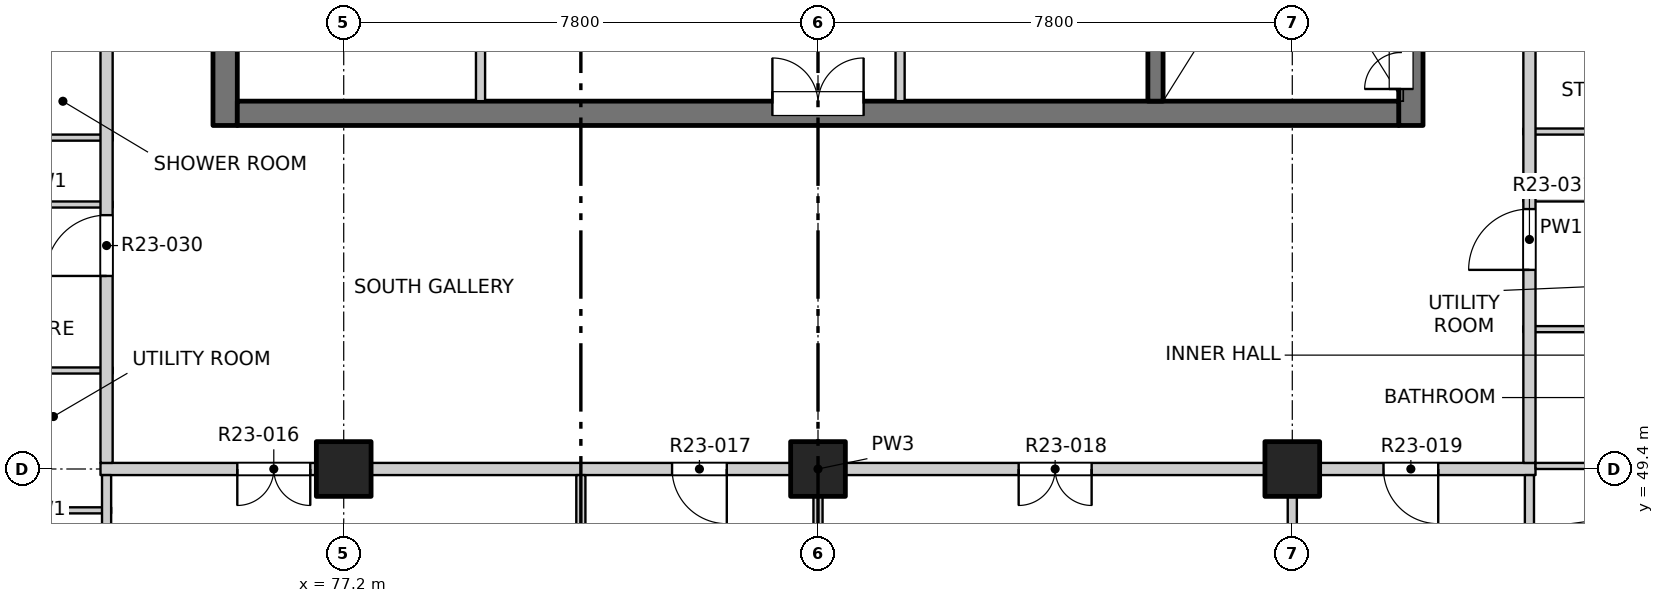
"""IFC4 building model, lengths in metres.
Left out: names, types, materials, properties, quantities, classifications, styles, units other than length and angle.
Written with IfcOpenShell. Run it as: python <this file> out.ifc"""

import sys

from ifc_helpers import new_model, si_unit, direction, frame, frame_2d, origin, origin_2d, place, context, subcontext, project, spatial, rectangle, extrude, element, fill, save


model = new_model("IFC4")
c1 = context("Model", 3, precision=1e-05, world=origin(), true_north=direction((0.0, 1.0)))
c2 = subcontext(c1, "Body", "Model", "MODEL_VIEW")
j1 = project(units=[si_unit("LENGTHUNIT", "METRE"), si_unit("PLANEANGLEUNIT", "RADIAN")], contexts=[c1])
p1 = place(None, origin())
s1 = spatial("IfcSite", under=j1, at=p1, CompositionType="ELEMENT")
p2 = place(p1, origin())
s2 = spatial("IfcBuilding", under=s1, at=p2, CompositionType="ELEMENT")
p3 = place(p2, frame((0.0, 0.0, 234.7)))
s3 = spatial("IfcBuildingStorey", under=s2, at=p3, CompositionType="ELEMENT", Elevation=234.7)
for number, where, z_axis, x_axis in (
    (1, (77.2, 49.4, -0.25), (0.0, 0.0, 1.0), (1.0, 0.0, 0.0)),
    (2, (85.0, 49.4, -0.25), (0.0, 0.0, 1.0), (1.0, 0.0, 0.0)),
    (3, (92.8, 49.4, -0.25), (0.0, 0.0, 1.0), (1.0, 0.0, 0.0)),
):
    element("IfcColumn", number, at=place(p3, frame(where, z_axis=z_axis, x_axis=x_axis)), inside=s3, PredefinedType="COLUMN", context=c2, shape_type="SweptSolid", body=[
        extrude(rectangle(XDim=0.9, YDim=0.9, at=origin_2d()), origin(), (0.0, 0.0, 1.0), 3.4),
    ])
p4 = place(p3, frame((75.25, 55.05, -0.25), z_axis=(0.0, 0.0, 1.0), x_axis=(0.0, 1.0, 0.0)))
e4 = element("IfcWall", 4, at=p4, inside=s3, PredefinedType="SOLIDWALL", context=c2, shape_type="SweptSolid", body=[
    extrude(rectangle(XDim=22.25, YDim=0.4, at=frame_2d((11.125, 0.0))), origin(), (0.0, 0.0, 1.0), 3.4),
])
p5 = place(p4, frame((7.4, 0.0, 0.25)))
e5 = element("IfcOpeningElement", 5, at=p5, cuts=e4, PredefinedType="OPENING", context=c2, shape_type="SweptSolid", body=[
    extrude(rectangle(XDim=0.9, YDim=2.1, at=frame_2d((0.45, 1.05))), frame((0.0, 0.21, 0.0), z_axis=(0.0, -1.0, 0.0), x_axis=(1.0, 0.0, 0.0)), (0.0, 0.0, 1.0), 0.42),
])
p6 = place(p4, frame((12.05, 0.0, 0.25)))
e6 = element("IfcOpeningElement", 6, at=p6, cuts=e4, PredefinedType="OPENING", context=c2, shape_type="SweptSolid", body=[
    extrude(rectangle(XDim=0.9, YDim=2.1, at=frame_2d((0.45, 1.05))), frame((0.0, 0.21, 0.0), z_axis=(0.0, -1.0, 0.0), x_axis=(1.0, 0.0, 0.0)), (0.0, 0.0, 1.0), 0.42),
])
p7 = place(p4, frame((16.55, 0.0, 0.25)))
e7 = element("IfcOpeningElement", 7, at=p7, cuts=e4, PredefinedType="OPENING", context=c2, shape_type="SweptSolid", body=[
    extrude(rectangle(XDim=0.9, YDim=2.1, at=frame_2d((0.45, 1.05))), frame((0.0, 0.21, 0.0), z_axis=(0.0, -1.0, 0.0), x_axis=(1.0, 0.0, 0.0)), (0.0, 0.0, 1.0), 0.42),
])
p8 = place(p4, frame((20.0, 0.0, 0.25)))
e8 = element("IfcOpeningElement", 8, at=p8, cuts=e4, PredefinedType="OPENING", context=c2, shape_type="SweptSolid", body=[
    extrude(rectangle(XDim=0.9, YDim=2.1, at=frame_2d((0.45, 1.05))), frame((0.0, 0.21, 0.0), z_axis=(0.0, -1.0, 0.0), x_axis=(1.0, 0.0, 0.0)), (0.0, 0.0, 1.0), 0.42),
])
p9 = place(p3, frame((94.75, 55.05, -0.25), z_axis=(0.0, 0.0, 1.0), x_axis=(0.0, 1.0, 0.0)))
e9 = element("IfcWall", 9, at=p9, inside=s3, PredefinedType="SOLIDWALL", context=c2, shape_type="SweptSolid", body=[
    extrude(rectangle(XDim=6.9, YDim=0.4, at=frame_2d((3.45, 0.0))), origin(), (0.0, 0.0, 1.0), 3.4),
])
p10 = place(p9, frame((0.6, 0.0, 0.25)))
e10 = element("IfcOpeningElement", 10, at=p10, cuts=e9, PredefinedType="OPENING", context=c2, shape_type="SweptSolid", body=[
    extrude(rectangle(XDim=1.2, YDim=2.1, at=frame_2d((0.6, 1.05))), frame((0.0, 0.21, 0.0), z_axis=(0.0, -1.0, 0.0), x_axis=(1.0, 0.0, 0.0)), (0.0, 0.0, 1.0), 0.42),
])
p11 = place(p3, frame((75.45, 55.25, -0.25), z_axis=(0.0, 0.0, 1.0), x_axis=(1.0, 0.0, 0.0)))
e11 = element("IfcWall", 11, at=p11, inside=s3, PredefinedType="SOLIDWALL", context=c2, shape_type="SweptSolid", body=[
    extrude(rectangle(XDim=19.1, YDim=0.4, at=frame_2d((9.55, 0.0))), origin(), (0.0, 0.0, 1.0), 3.4),
])
p12 = place(p11, frame((8.8, 0.0, 0.25)))
e12 = element("IfcOpeningElement", 12, at=p12, cuts=e11, PredefinedType="OPENING", context=c2, shape_type="SweptSolid", body=[
    extrude(rectangle(XDim=1.5, YDim=2.1, at=frame_2d((0.75, 1.05))), frame((0.0, 0.21, 0.0), z_axis=(0.0, -1.0, 0.0), x_axis=(1.0, 0.0, 0.0)), (0.0, 0.0, 1.0), 0.42),
])
p13 = place(p3, frame((90.55, 55.45, -0.25), z_axis=(0.0, 0.0, 1.0), x_axis=(0.0, 1.0, 0.0)))
e13 = element("IfcWall", 13, at=p13, inside=s3, PredefinedType="SOLIDWALL", context=c2, shape_type="SweptSolid", body=[
    extrude(rectangle(XDim=6.5, YDim=0.25, at=frame_2d((3.25, 0.0))), origin(), (0.0, 0.0, 1.0), 3.4),
])
p14 = place(p3, frame((71.18, 48.72, 0.0), z_axis=(0.0, 0.0, 1.0), x_axis=(1.0, 0.0, 0.0)))
e14 = element("IfcWall", 14, at=p14, inside=s3, PredefinedType="PARTITIONING", context=c2, shape_type="SweptSolid", body=[
    extrude(rectangle(XDim=2.195, YDim=0.1, at=frame_2d((1.097, 0.0))), origin(), (0.0, 0.0, 1.0), 3.15),
])
p15 = place(p3, frame((73.2, 49.4, 0.0), z_axis=(0.0, 0.0, 1.0), x_axis=(1.0, 0.0, 0.0)))
e15 = element("IfcWall", 15, at=p15, inside=s3, PredefinedType="PARTITIONING", context=c2, shape_type="SweptSolid", body=[
    extrude(rectangle(XDim=23.6, YDim=0.2, at=frame_2d((11.8, 0.0))), origin(), (0.0, 0.0, 1.0), 3.15),
])
p16 = place(p15, frame((2.25, 0.0, 0.0)))
e16 = element("IfcOpeningElement", 16, at=p16, cuts=e15, PredefinedType="OPENING", context=c2, shape_type="SweptSolid", body=[
    extrude(rectangle(XDim=1.2, YDim=2.1, at=frame_2d((0.6, 1.05))), frame((0.0, 0.11, 0.0), z_axis=(0.0, -1.0, 0.0), x_axis=(1.0, 0.0, 0.0)), (0.0, 0.0, 1.0), 0.22),
])
p17 = place(p15, frame((9.4, 0.0, 0.0)))
e17 = element("IfcOpeningElement", 17, at=p17, cuts=e15, PredefinedType="OPENING", context=c2, shape_type="SweptSolid", body=[
    extrude(rectangle(XDim=0.9, YDim=2.1, at=frame_2d((0.45, 1.05))), frame((0.0, 0.11, 0.0), z_axis=(0.0, -1.0, 0.0), x_axis=(1.0, 0.0, 0.0)), (0.0, 0.0, 1.0), 0.22),
])
p18 = place(p15, frame((15.1, 0.0, 0.0)))
e18 = element("IfcOpeningElement", 18, at=p18, cuts=e15, PredefinedType="OPENING", context=c2, shape_type="SweptSolid", body=[
    extrude(rectangle(XDim=1.2, YDim=2.1, at=frame_2d((0.6, 1.05))), frame((0.0, 0.11, 0.0), z_axis=(0.0, -1.0, 0.0), x_axis=(1.0, 0.0, 0.0)), (0.0, 0.0, 1.0), 0.22),
])
p19 = place(p15, frame((21.1, 0.0, 0.0)))
e19 = element("IfcOpeningElement", 19, at=p19, cuts=e15, PredefinedType="OPENING", context=c2, shape_type="SweptSolid", body=[
    extrude(rectangle(XDim=0.9, YDim=2.1, at=frame_2d((0.45, 1.05))), frame((0.0, 0.11, 0.0), z_axis=(0.0, -1.0, 0.0), x_axis=(1.0, 0.0, 0.0)), (0.0, 0.0, 1.0), 0.22),
])
p20 = place(p3, frame((96.8, 49.45, 0.0), z_axis=(0.0, 0.0, 1.0), x_axis=(1.0, 0.0, 0.0)))
e20 = element("IfcWall", 20, at=p20, inside=s3, PredefinedType="PARTITIONING", context=c2, shape_type="SweptSolid", body=[
    extrude(rectangle(XDim=2.02, YDim=0.1, at=frame_2d((1.01, 0.0))), origin(), (0.0, 0.0, 1.0), 3.15),
])
for number, where, z_axis, x_axis in (
    (21, (71.18, 51.02, 0.0), (0.0, 0.0, 1.0), (1.0, 0.0, 0.0)),
    (22, (96.6, 51.7, 0.0), (0.0, 0.0, 1.0), (1.0, 0.0, 0.0)),
    (23, (71.18, 53.75, 0.0), (0.0, 0.0, 1.0), (1.0, 0.0, 0.0)),
    (24, (96.6, 53.85, 0.0), (0.0, 0.0, 1.0), (1.0, 0.0, 0.0)),
    (25, (71.18, 54.85, 0.0), (0.0, 0.0, 1.0), (1.0, 0.0, 0.0)),
    (26, (96.6, 54.95, 0.0), (0.0, 0.0, 1.0), (1.0, 0.0, 0.0)),
):
    element("IfcWall", number, at=place(p3, frame(where, z_axis=z_axis, x_axis=x_axis)), inside=s3, PredefinedType="PARTITIONING", context=c2, shape_type="SweptSolid", body=[
        extrude(rectangle(XDim=2.22, YDim=0.1, at=frame_2d((1.11, 0.0))), origin(), (0.0, 0.0, 1.0), 3.15),
    ])
p21 = place(p3, frame((73.3, 41.9, 0.0), z_axis=(0.0, 0.0, 1.0), x_axis=(0.0, 1.0, 0.0)))
e27 = element("IfcWall", 27, at=p21, inside=s3, PredefinedType="PARTITIONING", context=c2, shape_type="SweptSolid", body=[
    extrude(rectangle(XDim=7.4, YDim=0.15, at=frame_2d((3.7, 0.0))), origin(), (0.0, 0.0, 1.0), 3.15),
])
p22 = place(p3, frame((73.3, 49.5, 0.0), z_axis=(0.0, 0.0, 1.0), x_axis=(0.0, 1.0, 0.0)))
e28 = element("IfcWall", 28, at=p22, inside=s3, PredefinedType="PARTITIONING", context=c2, shape_type="SweptSolid", body=[
    extrude(rectangle(XDim=34.9, YDim=0.2, at=frame_2d((17.45, 0.0))), origin(), (0.0, 0.0, 1.0), 3.15),
])
p23 = place(p22, frame((3.075, 0.0, 0.0)))
e29 = element("IfcOpeningElement", 29, at=p23, cuts=e28, PredefinedType="OPENING", context=c2, shape_type="SweptSolid", body=[
    extrude(rectangle(XDim=1.0, YDim=2.1, at=frame_2d((0.5, 1.05))), frame((0.0, 0.11, 0.0), z_axis=(0.0, -1.0, 0.0), x_axis=(1.0, 0.0, 0.0)), (0.0, 0.0, 1.0), 0.22),
])
p24 = place(p22, frame((14.575, 0.0, 0.0)))
e30 = element("IfcOpeningElement", 30, at=p24, cuts=e28, PredefinedType="OPENING", context=c2, shape_type="SweptSolid", body=[
    extrude(rectangle(XDim=1.0, YDim=2.1, at=frame_2d((0.5, 1.05))), frame((0.0, 0.11, 0.0), z_axis=(0.0, -1.0, 0.0), x_axis=(1.0, 0.0, 0.0)), (0.0, 0.0, 1.0), 0.22),
])
p25 = place(p22, frame((33.625, 0.0, 0.0)))
e31 = element("IfcOpeningElement", 31, at=p25, cuts=e28, PredefinedType="OPENING", context=c2, shape_type="SweptSolid", body=[
    extrude(rectangle(XDim=1.0, YDim=2.1, at=frame_2d((0.5, 1.05))), frame((0.0, 0.11, 0.0), z_axis=(0.0, -1.0, 0.0), x_axis=(1.0, 0.0, 0.0)), (0.0, 0.0, 1.0), 0.22),
])
p26 = place(p3, frame((79.45, 55.45, 0.0), z_axis=(0.0, 0.0, 1.0), x_axis=(0.0, 1.0, 0.0)))
e32 = element("IfcWall", 32, at=p26, inside=s3, PredefinedType="PARTITIONING", context=c2, shape_type="SweptSolid", body=[
    extrude(rectangle(XDim=5.45, YDim=0.15, at=frame_2d((2.725, 0.0))), origin(), (0.0, 0.0, 1.0), 3.15),
])
p27 = place(p26, frame((2.25, 0.0, 0.0)))
e33 = element("IfcOpeningElement", 33, at=p27, cuts=e32, PredefinedType="OPENING", context=c2, shape_type="SweptSolid", body=[
    extrude(rectangle(XDim=0.9, YDim=2.1, at=frame_2d((0.45, 1.05))), frame((0.0, 0.085, 0.0), z_axis=(0.0, -1.0, 0.0), x_axis=(1.0, 0.0, 0.0)), (0.0, 0.0, 1.0), 0.17),
])
p28 = place(p3, frame((81.1, 41.9, 0.0), z_axis=(0.0, 0.0, 1.0), x_axis=(0.0, 1.0, 0.0)))
e34 = element("IfcWall", 34, at=p28, inside=s3, PredefinedType="PARTITIONING", context=c2, shape_type="SweptSolid", body=[
    extrude(rectangle(XDim=7.4, YDim=0.15, at=frame_2d((3.7, 0.0))), origin(), (0.0, 0.0, 1.0), 2.55),
])
p29 = place(p3, frame((85.0, 41.9, 0.0), z_axis=(0.0, 0.0, 1.0), x_axis=(0.0, 1.0, 0.0)))
e35 = element("IfcWall", 35, at=p29, inside=s3, PredefinedType="PARTITIONING", context=c2, shape_type="SweptSolid", body=[
    extrude(rectangle(XDim=7.4, YDim=0.15, at=frame_2d((3.7, 0.0))), origin(), (0.0, 0.0, 1.0), 3.15),
])
p30 = place(p3, frame((86.35, 55.45, 0.0), z_axis=(0.0, 0.0, 1.0), x_axis=(0.0, 1.0, 0.0)))
e36 = element("IfcWall", 36, at=p30, inside=s3, PredefinedType="PARTITIONING", context=c2, shape_type="SweptSolid", body=[
    extrude(rectangle(XDim=5.575, YDim=0.15, at=frame_2d((2.788, 0.0))), origin(), (0.0, 0.0, 1.0), 3.15),
])
p31 = place(p30, frame((2.25, 0.0, 0.0)))
e37 = element("IfcOpeningElement", 37, at=p31, cuts=e36, PredefinedType="OPENING", context=c2, shape_type="SweptSolid", body=[
    extrude(rectangle(XDim=0.9, YDim=2.1, at=frame_2d((0.45, 1.05))), frame((0.0, 0.085, 0.0), z_axis=(0.0, -1.0, 0.0), x_axis=(1.0, 0.0, 0.0)), (0.0, 0.0, 1.0), 0.17),
])
for number, where, z_axis, x_axis in (
    (38, (92.8, 41.9, 0.0), (0.0, 0.0, 1.0), (0.0, 1.0, 0.0)),
    (39, (96.7, 41.9, 0.0), (0.0, 0.0, 1.0), (0.0, 1.0, 0.0)),
):
    element("IfcWall", number, at=place(p3, frame(where, z_axis=z_axis, x_axis=x_axis)), inside=s3, PredefinedType="PARTITIONING", context=c2, shape_type="SweptSolid", body=[
        extrude(rectangle(XDim=7.4, YDim=0.15, at=frame_2d((3.7, 0.0))), origin(), (0.0, 0.0, 1.0), 3.15),
    ])
p32 = place(p3, frame((96.7, 49.5, 0.0), z_axis=(0.0, 0.0, 1.0), x_axis=(0.0, 1.0, 0.0)))
e40 = element("IfcWall", 40, at=p32, inside=s3, PredefinedType="PARTITIONING", context=c2, shape_type="SweptSolid", body=[
    extrude(rectangle(XDim=34.9, YDim=0.2, at=frame_2d((17.45, 0.0))), origin(), (0.0, 0.0, 1.0), 3.15),
])
p33 = place(p32, frame((3.175, 0.0, 0.0)))
e41 = element("IfcOpeningElement", 41, at=p33, cuts=e40, PredefinedType="OPENING", context=c2, shape_type="SweptSolid", body=[
    extrude(rectangle(XDim=1.0, YDim=2.1, at=frame_2d((0.5, 1.05))), frame((0.0, 0.11, 0.0), z_axis=(0.0, -1.0, 0.0), x_axis=(1.0, 0.0, 0.0)), (0.0, 0.0, 1.0), 0.22),
])
p34 = place(p32, frame((14.625, 0.0, 0.0)))
e42 = element("IfcOpeningElement", 42, at=p34, cuts=e40, PredefinedType="OPENING", context=c2, shape_type="SweptSolid", body=[
    extrude(rectangle(XDim=1.0, YDim=2.1, at=frame_2d((0.5, 1.05))), frame((0.0, 0.11, 0.0), z_axis=(0.0, -1.0, 0.0), x_axis=(1.0, 0.0, 0.0)), (0.0, 0.0, 1.0), 0.22),
])
p35 = place(p32, frame((30.175, 0.0, 0.0)))
e43 = element("IfcOpeningElement", 43, at=p35, cuts=e40, PredefinedType="OPENING", context=c2, shape_type="SweptSolid", body=[
    extrude(rectangle(XDim=1.0, YDim=2.1, at=frame_2d((0.5, 1.05))), frame((0.0, 0.11, 0.0), z_axis=(0.0, -1.0, 0.0), x_axis=(1.0, 0.0, 0.0)), (0.0, 0.0, 1.0), 0.22),
])
p36 = place(p16, origin())
e44 = element("IfcDoor", 44, at=p36, inside=s3, OperationType="DOUBLE_DOOR_SINGLE_SWING", PredefinedType="DOOR", context=c2, shape_type="SweptSolid", body=[
    extrude(rectangle(XDim=1.2, YDim=2.1, at=frame_2d((0.6, 1.05))), frame((0.0, 0.025, 0.0), z_axis=(0.0, -1.0, 0.0), x_axis=(1.0, 0.0, 0.0)), (0.0, 0.0, 1.0), 0.05),
])
fill(e16, e44)
p37 = place(p17, origin())
e45 = element("IfcDoor", 45, at=p37, inside=s3, OperationType="SINGLE_SWING_LEFT", PredefinedType="DOOR", context=c2, shape_type="SweptSolid", body=[
    extrude(rectangle(XDim=0.9, YDim=2.1, at=frame_2d((0.45, 1.05))), frame((0.0, 0.025, 0.0), z_axis=(0.0, -1.0, 0.0), x_axis=(1.0, 0.0, 0.0)), (0.0, 0.0, 1.0), 0.05),
])
fill(e17, e45)
p38 = place(p18, origin())
e46 = element("IfcDoor", 46, at=p38, inside=s3, OperationType="DOUBLE_DOOR_SINGLE_SWING", PredefinedType="DOOR", context=c2, shape_type="SweptSolid", body=[
    extrude(rectangle(XDim=1.2, YDim=2.1, at=frame_2d((0.6, 1.05))), frame((0.0, 0.025, 0.0), z_axis=(0.0, -1.0, 0.0), x_axis=(1.0, 0.0, 0.0)), (0.0, 0.0, 1.0), 0.05),
])
fill(e18, e46)
p39 = place(p19, origin())
e47 = element("IfcDoor", 47, at=p39, inside=s3, OperationType="SINGLE_SWING_LEFT", PredefinedType="DOOR", context=c2, shape_type="SweptSolid", body=[
    extrude(rectangle(XDim=0.9, YDim=2.1, at=frame_2d((0.45, 1.05))), frame((0.0, 0.025, 0.0), z_axis=(0.0, -1.0, 0.0), x_axis=(1.0, 0.0, 0.0)), (0.0, 0.0, 1.0), 0.05),
])
fill(e19, e47)
p40 = place(p23, origin())
e48 = element("IfcDoor", 48, at=p40, inside=s3, OperationType="SINGLE_SWING_LEFT", PredefinedType="DOOR", context=c2, shape_type="SweptSolid", body=[
    extrude(rectangle(XDim=1.0, YDim=2.1, at=frame_2d((0.5, 1.05))), frame((0.0, 0.025, 0.0), z_axis=(0.0, -1.0, 0.0), x_axis=(1.0, 0.0, 0.0)), (0.0, 0.0, 1.0), 0.05),
])
fill(e29, e48)
p41 = place(p33, origin())
e49 = element("IfcDoor", 49, at=p41, inside=s3, OperationType="SINGLE_SWING_RIGHT", PredefinedType="DOOR", context=c2, shape_type="SweptSolid", body=[
    extrude(rectangle(XDim=1.0, YDim=2.1, at=frame_2d((0.5, 1.05))), frame((0.0, 0.025, 0.0), z_axis=(0.0, -1.0, 0.0), x_axis=(1.0, 0.0, 0.0)), (0.0, 0.0, 1.0), 0.05),
])
fill(e41, e49)
p42 = place(p12, origin())
e50 = element("IfcDoor", 50, at=p42, inside=s3, OperationType="DOUBLE_DOOR_SINGLE_SWING", PredefinedType="DOOR", context=c2, shape_type="SweptSolid", body=[
    extrude(rectangle(XDim=1.5, YDim=2.1, at=frame_2d((0.75, 1.05))), frame((0.0, 0.185, 0.0), z_axis=(0.0, -1.0, 0.0), x_axis=(1.0, 0.0, 0.0)), (0.0, 0.0, 1.0), 0.05),
])
fill(e12, e50)
p43 = place(p10, origin())
e51 = element("IfcDoor", 51, at=p43, inside=s3, OperationType="DOUBLE_DOOR_SINGLE_SWING", PredefinedType="DOOR", context=c2, shape_type="SweptSolid", body=[
    extrude(rectangle(XDim=1.2, YDim=2.1, at=frame_2d((0.6, 1.05))), frame((0.0, 0.185, 0.0), z_axis=(0.0, -1.0, 0.0), x_axis=(1.0, 0.0, 0.0)), (0.0, 0.0, 1.0), 0.05),
])
fill(e10, e51)
save(model, sys.argv[1])
